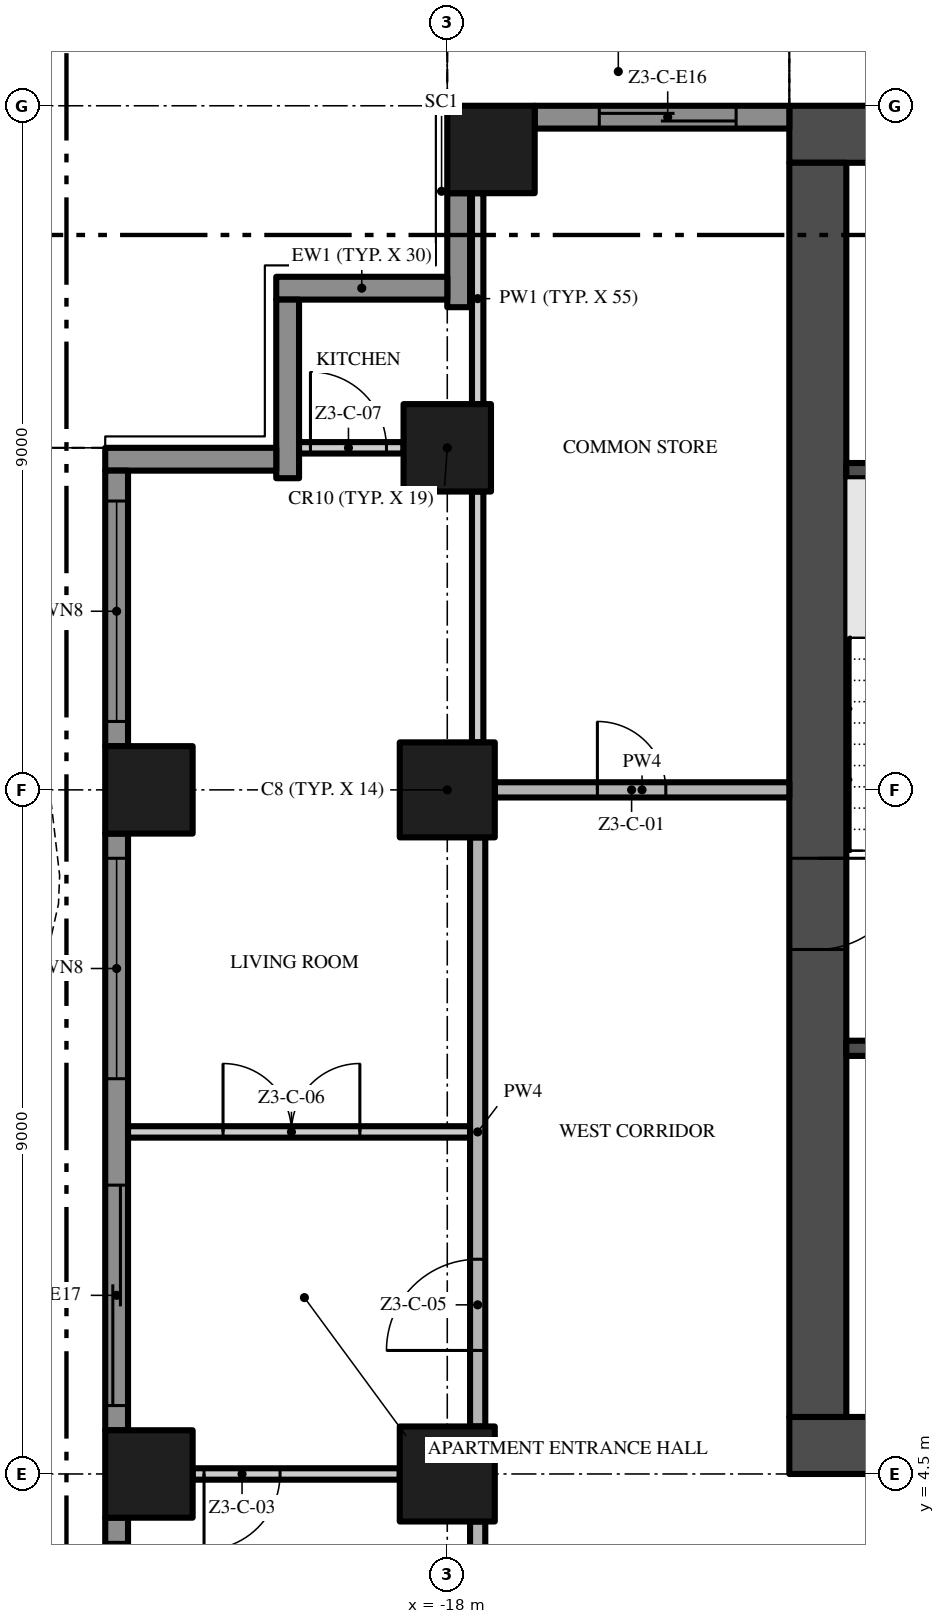
"""IFC4 building model, lengths in metres.
Left out: names, types, materials, properties, quantities, classifications, styles, units other than length and angle.
Written with IfcOpenShell. Run it as: python <this file> out.ifc"""

import sys

from ifc_helpers import new_model, si_unit, direction, frame, frame_2d, origin, origin_2d, place, context, subcontext, project, spatial, polyline, rectangle, outline, extrude, element, fill, save


model = new_model("IFC4")
c1 = context("Model", 3, precision=1e-05, world=origin(), true_north=direction((0.0, 1.0)))
c2 = subcontext(c1, "Body", "Model", "MODEL_VIEW")
j1 = project(units=[si_unit("LENGTHUNIT", "METRE"), si_unit("PLANEANGLEUNIT", "RADIAN")], contexts=[c1])
p1 = place(None, origin())
s1 = spatial("IfcSite", under=j1, at=p1, CompositionType="ELEMENT")
p2 = place(p1, origin())
s2 = spatial("IfcBuilding", under=s1, at=p2, CompositionType="ELEMENT")
p3 = place(p2, frame((0.0, 0.0, 155.4)))
s3 = spatial("IfcBuildingStorey", under=s2, at=p3, CompositionType="ELEMENT", Elevation=155.4)
p4 = place(p3, frame((-13.5, 4.875, -0.3), z_axis=(0.0, 0.0, 1.0), x_axis=(1.0, 0.0, 0.0)))
e1 = element("IfcWall", 1, at=p4, inside=s3, PredefinedType="SHEAR", context=c2, shape_type="SweptSolid", body=[
    extrude(rectangle(XDim=27.0, YDim=0.75, at=frame_2d((13.5, 0.0))), origin(), (0.0, 0.0, 1.0), 3.8),
])
p5 = place(p4, frame((12.0, 0.0, 0.3)))
e2 = element("IfcOpeningElement", 2, at=p5, cuts=e1, PredefinedType="OPENING", context=c2, shape_type="SweptSolid", body=[
    extrude(rectangle(XDim=3.0, YDim=2.4, at=frame_2d((1.5, 1.2))), frame((0.0, 0.385, 0.0), z_axis=(0.0, -1.0, 0.0), x_axis=(1.0, 0.0, 0.0)), (0.0, 0.0, 1.0), 0.77),
])
p6 = place(p4, frame((4.9, 0.0, 0.3)))
e3 = element("IfcOpeningElement", 3, at=p6, cuts=e1, PredefinedType="OPENING", context=c2, shape_type="SweptSolid", body=[
    extrude(rectangle(XDim=1.2, YDim=2.2, at=frame_2d((0.6, 1.1))), frame((0.0, 0.385, 0.0), z_axis=(0.0, -1.0, 0.0), x_axis=(1.0, 0.0, 0.0)), (0.0, 0.0, 1.0), 0.77),
])
p7 = place(p4, frame((20.75, 0.0, 0.3)))
e4 = element("IfcOpeningElement", 4, at=p7, cuts=e1, PredefinedType="OPENING", context=c2, shape_type="SweptSolid", body=[
    extrude(rectangle(XDim=1.5, YDim=2.2, at=frame_2d((0.75, 1.1))), frame((0.0, 0.385, 0.0), z_axis=(0.0, -1.0, 0.0), x_axis=(1.0, 0.0, 0.0)), (0.0, 0.0, 1.0), 0.77),
])
p8 = place(p4, frame((17.4, 0.0, 0.3)))
e5 = element("IfcOpeningElement", 5, at=p8, cuts=e1, PredefinedType="OPENING", context=c2, shape_type="SweptSolid", body=[
    extrude(rectangle(XDim=1.2, YDim=2.2, at=frame_2d((0.6, 1.1))), frame((0.0, 0.385, 0.0), z_axis=(0.0, -1.0, 0.0), x_axis=(1.0, 0.0, 0.0)), (0.0, 0.0, 1.0), 0.77),
])
p9 = place(p3, frame((13.5, 22.125, -0.3), z_axis=(0.0, 0.0, 1.0), x_axis=(-1.0, 0.0, 0.0)))
e6 = element("IfcWall", 6, at=p9, inside=s3, PredefinedType="SHEAR", context=c2, shape_type="SweptSolid", body=[
    extrude(rectangle(XDim=27.0, YDim=0.75, at=frame_2d((13.5, 0.0))), origin(), (0.0, 0.0, 1.0), 3.8),
])
p10 = place(p3, frame((-13.125, 21.75, -0.3), z_axis=(0.0, 0.0, 1.0), x_axis=(0.0, -1.0, 0.0)))
e7 = element("IfcWall", 7, at=p10, inside=s3, PredefinedType="SHEAR", context=c2, shape_type="SweptSolid", body=[
    extrude(rectangle(XDim=16.5, YDim=0.75, at=frame_2d((8.25, 0.0))), origin(), (0.0, 0.0, 1.0), 3.8),
])
p11 = place(p10, frame((9.15, 0.0, 0.3)))
e8 = element("IfcOpeningElement", 8, at=p11, cuts=e7, PredefinedType="OPENING", context=c2, shape_type="SweptSolid", body=[
    extrude(rectangle(XDim=1.2, YDim=2.2, at=frame_2d((0.6, 1.1))), frame((0.0, 0.385, 0.0), z_axis=(0.0, -1.0, 0.0), x_axis=(1.0, 0.0, 0.0)), (0.0, 0.0, 1.0), 0.77),
])
p12 = place(p3, frame((-18.0, 13.5, 0.0), z_axis=(0.0, 0.0, 1.0), x_axis=(1.0, 0.0, 0.0)))
e9 = element("IfcColumn", 9, at=p12, inside=s3, PredefinedType="COLUMN", context=c2, shape_type="SweptSolid", body=[
    extrude(rectangle(XDim=1.25, YDim=1.25, at=origin_2d()), origin(), (0.0, 0.0, 1.0), 3.5),
])
p13 = place(p3, frame((-17.425, 21.925, 0.0), z_axis=(0.0, 0.0, 1.0), x_axis=(1.0, 0.0, 0.0)))
e10 = element("IfcColumn", 10, at=p13, inside=s3, PredefinedType="COLUMN", context=c2, shape_type="SweptSolid", body=[
    extrude(rectangle(XDim=1.15, YDim=1.15, at=origin_2d()), origin(), (0.0, 0.0, 1.0), 3.5),
])
p14 = place(p3, frame((-18.0, 4.5, 0.0), z_axis=(0.0, 0.0, 1.0), x_axis=(1.0, 0.0, 0.0)))
e11 = element("IfcColumn", 11, at=p14, inside=s3, PredefinedType="COLUMN", context=c2, shape_type="SweptSolid", body=[
    extrude(rectangle(XDim=1.25, YDim=1.25, at=origin_2d()), origin(), (0.0, 0.0, 1.0), 3.5),
])
for number, where, z_axis, x_axis in (
    (12, (-21.925, 13.5, 0.0), (0.0, 0.0, 1.0), (1.0, 0.0, 0.0)),
    (13, (-18.0, 18.0, 0.0), (0.0, 0.0, 1.0), (1.0, 0.0, 0.0)),
    (14, (-21.925, 4.5, 0.0), (0.0, 0.0, 1.0), (1.0, 0.0, 0.0)),
):
    element("IfcColumn", number, at=place(p3, frame(where, z_axis=z_axis, x_axis=x_axis)), inside=s3, PredefinedType="COLUMN", context=c2, shape_type="SweptSolid", body=[
        extrude(rectangle(XDim=1.15, YDim=1.15, at=origin_2d()), origin(), (0.0, 0.0, 1.0), 3.5),
    ])
p15 = place(p3, frame((-16.85, 22.35, 0.0), z_axis=(0.0, 0.0, 1.0), x_axis=(1.0, 0.0, 0.0)))
e15 = element("IfcWall", 15, at=p15, inside=s3, PredefinedType="SOLIDWALL", context=c2, shape_type="SweptSolid", body=[
    extrude(rectangle(XDim=3.35, YDim=0.3, at=frame_2d((1.675, 0.0))), origin(), (0.0, 0.0, 1.0), 3.5),
])
p16 = place(p15, frame((0.85, 0.0, 0.0)))
e16 = element("IfcOpeningElement", 16, at=p16, cuts=e15, PredefinedType="OPENING", context=c2, shape_type="SweptSolid", body=[
    extrude(rectangle(XDim=1.8, YDim=2.4, at=frame_2d((0.9, 1.2))), frame((0.0, 0.16, 0.0), z_axis=(0.0, -1.0, 0.0), x_axis=(1.0, 0.0, 0.0)), (0.0, 0.0, 1.0), 0.32),
])
p17 = place(p3, frame((-17.85, 19.85, 0.0), z_axis=(0.0, 0.0, 1.0), x_axis=(0.0, 1.0, 0.0)))
e17 = element("IfcWall", 17, at=p17, inside=s3, PredefinedType="SOLIDWALL", context=c2, shape_type="SweptSolid", body=[
    extrude(rectangle(XDim=1.5, YDim=0.3, at=frame_2d((0.75, 0.0))), origin(), (0.0, 0.0, 1.0), 3.5),
])
p18 = place(p3, frame((-20.25, 20.1, 0.0), z_axis=(0.0, 0.0, 1.0), x_axis=(1.0, 0.0, 0.0)))
e18 = element("IfcWall", 18, at=p18, inside=s3, PredefinedType="SOLIDWALL", context=c2, shape_type="SweptSolid", body=[
    extrude(rectangle(XDim=2.25, YDim=0.3, at=frame_2d((1.125, 0.0))), origin(), (0.0, 0.0, 1.0), 3.5),
])
p19 = place(p3, frame((-20.1, 17.6, 0.0), z_axis=(0.0, 0.0, 1.0), x_axis=(0.0, 1.0, 0.0)))
e19 = element("IfcWall", 19, at=p19, inside=s3, PredefinedType="SOLIDWALL", context=c2, shape_type="SweptSolid", body=[
    extrude(rectangle(XDim=2.35, YDim=0.3, at=frame_2d((1.175, 0.0))), origin(), (0.0, 0.0, 1.0), 3.5),
])
p20 = place(p3, frame((-22.5, 17.85, 0.0), z_axis=(0.0, 0.0, 1.0), x_axis=(1.0, 0.0, 0.0)))
e20 = element("IfcWall", 20, at=p20, inside=s3, PredefinedType="SOLIDWALL", context=c2, shape_type="SweptSolid", body=[
    extrude(rectangle(XDim=2.25, YDim=0.3, at=frame_2d((1.125, 0.0))), origin(), (0.0, 0.0, 1.0), 3.5),
])
p21 = place(p3, frame((-22.35, 14.075, 0.0), z_axis=(0.0, 0.0, 1.0), x_axis=(0.0, 1.0, 0.0)))
e21 = element("IfcWall", 21, at=p21, inside=s3, PredefinedType="SOLIDWALL", context=c2, shape_type="SweptSolid", body=[
    extrude(rectangle(XDim=3.625, YDim=0.3, at=frame_2d((1.812, 0.0))), origin(), (0.0, 0.0, 1.0), 3.5),
])
p22 = place(p21, frame((0.325, 0.0, 0.45)))
e22 = element("IfcOpeningElement", 22, at=p22, cuts=e21, PredefinedType="OPENING", context=c2, shape_type="SweptSolid", body=[
    extrude(rectangle(XDim=2.9, YDim=2.65, at=frame_2d((1.45, 1.325))), frame((0.0, 0.16, 0.0), z_axis=(0.0, -1.0, 0.0), x_axis=(1.0, 0.0, 0.0)), (0.0, 0.0, 1.0), 0.32),
])
p23 = place(p3, frame((-22.35, 5.075, 0.0), z_axis=(0.0, 0.0, 1.0), x_axis=(0.0, 1.0, 0.0)))
e23 = element("IfcWall", 23, at=p23, inside=s3, PredefinedType="SOLIDWALL", context=c2, shape_type="SweptSolid", body=[
    extrude(rectangle(XDim=7.85, YDim=0.3, at=frame_2d((3.925, 0.0))), origin(), (0.0, 0.0, 1.0), 3.5),
])
p24 = place(p23, frame((4.625, 0.0, 0.45)))
e24 = element("IfcOpeningElement", 24, at=p24, cuts=e23, PredefinedType="OPENING", context=c2, shape_type="SweptSolid", body=[
    extrude(rectangle(XDim=2.9, YDim=2.65, at=frame_2d((1.45, 1.325))), frame((0.0, 0.16, 0.0), z_axis=(0.0, -1.0, 0.0), x_axis=(1.0, 0.0, 0.0)), (0.0, 0.0, 1.0), 0.32),
])
p25 = place(p23, frame((0.325, 0.0, 0.0)))
e25 = element("IfcOpeningElement", 25, at=p25, cuts=e23, PredefinedType="OPENING", context=c2, shape_type="SweptSolid", body=[
    extrude(rectangle(XDim=2.9, YDim=2.4, at=frame_2d((1.45, 1.2))), frame((0.0, 0.16, 0.0), z_axis=(0.0, -1.0, 0.0), x_axis=(1.0, 0.0, 0.0)), (0.0, 0.0, 1.0), 0.32),
])
p26 = place(p3, frame((-22.35, -3.925, 0.0), z_axis=(0.0, 0.0, 1.0), x_axis=(0.0, 1.0, 0.0)))
e26 = element("IfcWall", 26, at=p26, inside=s3, PredefinedType="SOLIDWALL", context=c2, shape_type="SweptSolid", body=[
    extrude(rectangle(XDim=7.85, YDim=0.3, at=frame_2d((3.925, 0.0))), origin(), (0.0, 0.0, 1.0), 3.5),
])
p27 = place(p26, frame((4.625, 0.0, 0.0)))
e27 = element("IfcOpeningElement", 27, at=p27, cuts=e26, PredefinedType="OPENING", context=c2, shape_type="SweptSolid", body=[
    extrude(rectangle(XDim=2.9, YDim=2.4, at=frame_2d((1.45, 1.2))), frame((0.0, 0.16, 0.0), z_axis=(0.0, -1.0, 0.0), x_axis=(1.0, 0.0, 0.0)), (0.0, 0.0, 1.0), 0.32),
])
p28 = place(p26, frame((0.325, 0.0, 0.45)))
e28 = element("IfcOpeningElement", 28, at=p28, cuts=e26, PredefinedType="OPENING", context=c2, shape_type="SweptSolid", body=[
    extrude(rectangle(XDim=2.9, YDim=2.65, at=frame_2d((1.45, 1.325))), frame((0.0, 0.16, 0.0), z_axis=(0.0, -1.0, 0.0), x_axis=(1.0, 0.0, 0.0)), (0.0, 0.0, 1.0), 0.32),
])
p29 = place(p3, origin())
e29 = element("IfcWall", 29, at=p29, inside=s3, PredefinedType="USERDEFINED", context=c2, shape_type="SweptSolid", body=[
    extrude(outline(polyline([(-13.5, 25.149), (-15.0, 24.488), (-16.5, 23.755), (-18.0, 23.231), (-17.917, 22.995), (-16.404, 23.524), (-14.895, 24.261), (-13.399, 24.92), (-13.5, 25.149)])), origin(), (0.0, 0.0, 1.0), 0.9),
])
p30 = place(p3, origin())
e30 = element("IfcWall", 30, at=p30, inside=s3, PredefinedType="USERDEFINED", context=c2, shape_type="SweptSolid", body=[
    extrude(outline(polyline([(-25.149, 18.0), (-24.488, 16.5), (-23.755, 15.0), (-23.231, 13.5), (-23.1, 12.375), (-23.115, 12.0), (-23.451, 10.5), (-24.112, 9.0), (-24.845, 7.5), (-25.369, 6.0), (-25.5, 4.875), (-25.485, 4.5), (-25.149, 3.0), (-24.488, 1.5), (-23.755, 0.0), (-23.231, -1.5), (-23.1, -2.625), (-23.115, -3.0), (-23.451, -4.5), (-24.112, -6.0), (-24.845, -7.5), (-25.369, -9.0), (-25.5, -10.125), (-25.485, -10.5), (-25.149, -12.0), (-24.488, -13.5), (-24.259, -13.399), (-24.91, -11.921), (-25.236, -10.467), (-25.249, -10.135), (-25.124, -9.056), (-24.614, -7.596), (-23.885, -6.105), (-23.213, -4.579), (-22.866, -3.033), (-22.849, -2.615), (-22.986, -1.444), (-23.524, 0.096), (-24.261, 1.605), (-24.91, 3.079), (-25.236, 4.533), (-25.249, 4.865), (-25.124, 5.944), (-24.614, 7.404), (-23.885, 8.895), (-23.213, 10.421), (-22.866, 11.967), (-22.849, 12.385), (-22.986, 13.556), (-23.524, 15.096), (-24.261, 16.605), (-24.92, 18.101), (-25.149, 18.0)])), origin(), (0.0, 0.0, 1.0), 0.9),
])
for number, where, z_axis, x_axis in (
    (31, (-12.75, 10.1, 0.0), (0.0, 0.0, 1.0), (1.0, 0.0, 0.0)),
    (32, (-12.75, 17.7, 0.0), (0.0, 0.0, 1.0), (1.0, 0.0, 0.0)),
):
    element("IfcWall", number, at=place(p3, frame(where, z_axis=z_axis, x_axis=x_axis)), inside=s3, PredefinedType="SHEAR", context=c2, shape_type="SweptSolid", body=[
        extrude(rectangle(XDim=3.1, YDim=0.2, at=frame_2d((1.55, 0.0))), origin(), (0.0, 0.0, 1.0), 3.5),
    ])
p31 = place(p3, frame((-18.625, 4.5, 0.0), z_axis=(0.0, 0.0, 1.0), x_axis=(-1.0, 0.0, 0.0)))
e33 = element("IfcWall", 33, at=p31, inside=s3, PredefinedType="PARTITIONING", context=c2, shape_type="SweptSolid", body=[
    extrude(rectangle(XDim=2.725, YDim=0.15, at=frame_2d((1.363, 0.0))), origin(), (0.0, 0.0, 1.0), 3.5),
])
p32 = place(p31, frame((1.575, 0.0, 0.0)))
e34 = element("IfcOpeningElement", 34, at=p32, cuts=e33, PredefinedType="OPENING", context=c2, shape_type="SweptSolid", body=[
    extrude(rectangle(XDim=1.0, YDim=2.4, at=frame_2d((0.5, 1.2))), frame((0.0, 0.085, 0.0), z_axis=(0.0, -1.0, 0.0), x_axis=(1.0, 0.0, 0.0)), (0.0, 0.0, 1.0), 0.17),
])
p33 = place(p3, frame((-22.2, 9.0, 0.0), z_axis=(0.0, 0.0, 1.0), x_axis=(1.0, 0.0, 0.0)))
e35 = element("IfcWall", 35, at=p33, inside=s3, PredefinedType="PARTITIONING", context=c2, shape_type="SweptSolid", body=[
    extrude(rectangle(XDim=4.5, YDim=0.15, at=frame_2d((2.25, 0.0))), origin(), (0.0, 0.0, 1.0), 3.5),
])
p34 = place(p33, frame((1.25, 0.0, 0.0)))
e36 = element("IfcOpeningElement", 36, at=p34, cuts=e35, PredefinedType="OPENING", context=c2, shape_type="SweptSolid", body=[
    extrude(rectangle(XDim=1.8, YDim=2.4, at=frame_2d((0.9, 1.2))), frame((0.0, 0.085, 0.0), z_axis=(0.0, -1.0, 0.0), x_axis=(1.0, 0.0, 0.0)), (0.0, 0.0, 1.0), 0.17),
])
p35 = place(p3, frame((-17.375, 13.5, 0.0), z_axis=(0.0, 0.0, 1.0), x_axis=(1.0, 0.0, 0.0)))
e37 = element("IfcWall", 37, at=p35, inside=s3, PredefinedType="PARTITIONING", context=c2, shape_type="SweptSolid", body=[
    extrude(rectangle(XDim=3.875, YDim=0.2, at=frame_2d((1.938, 0.0))), origin(), (0.0, 0.0, 1.0), 3.5),
])
p36 = place(p35, frame((1.35, 0.0, 0.0)))
e38 = element("IfcOpeningElement", 38, at=p36, cuts=e37, PredefinedType="OPENING", context=c2, shape_type="SweptSolid", body=[
    extrude(rectangle(XDim=0.9, YDim=2.1, at=frame_2d((0.45, 1.05))), frame((0.0, 0.11, 0.0), z_axis=(0.0, -1.0, 0.0), x_axis=(1.0, 0.0, 0.0)), (0.0, 0.0, 1.0), 0.22),
])
p37 = place(p3, frame((-19.95, 18.0, 0.0), z_axis=(0.0, 0.0, 1.0), x_axis=(1.0, 0.0, 0.0)))
e39 = element("IfcWall", 39, at=p37, inside=s3, PredefinedType="PARTITIONING", context=c2, shape_type="SweptSolid", body=[
    extrude(rectangle(XDim=1.375, YDim=0.15, at=frame_2d((0.688, 0.0))), origin(), (0.0, 0.0, 1.0), 3.5),
])
p38 = place(p37, frame((0.15, 0.0, 0.0)))
e40 = element("IfcOpeningElement", 40, at=p38, cuts=e39, PredefinedType="OPENING", context=c2, shape_type="SweptSolid", body=[
    extrude(rectangle(XDim=1.0, YDim=2.4, at=frame_2d((0.5, 1.2))), frame((0.0, 0.085, 0.0), z_axis=(0.0, -1.0, 0.0), x_axis=(1.0, 0.0, 0.0)), (0.0, 0.0, 1.0), 0.17),
])
p39 = place(p3, frame((-17.6, -0.2, 0.0), z_axis=(0.0, 0.0, 1.0), x_axis=(0.0, 1.0, 0.0)))
e41 = element("IfcWall", 41, at=p39, inside=s3, PredefinedType="PARTITIONING", context=c2, shape_type="SweptSolid", body=[
    extrude(rectangle(XDim=4.075, YDim=0.2, at=frame_2d((2.038, 0.0))), origin(), (0.0, 0.0, 1.0), 3.5),
])
p40 = place(p3, frame((-17.6, 5.125, 0.0), z_axis=(0.0, 0.0, 1.0), x_axis=(0.0, 1.0, 0.0)))
e42 = element("IfcWall", 42, at=p40, inside=s3, PredefinedType="PARTITIONING", context=c2, shape_type="SweptSolid", body=[
    extrude(rectangle(XDim=7.75, YDim=0.2, at=frame_2d((3.875, 0.0))), origin(), (0.0, 0.0, 1.0), 3.5),
])
p41 = place(p40, frame((1.0, 0.0, 0.0)))
e43 = element("IfcOpeningElement", 43, at=p41, cuts=e42, PredefinedType="OPENING", context=c2, shape_type="SweptSolid", body=[
    extrude(rectangle(XDim=1.2, YDim=2.4, at=frame_2d((0.6, 1.2))), frame((0.0, 0.11, 0.0), z_axis=(0.0, -1.0, 0.0), x_axis=(1.0, 0.0, 0.0)), (0.0, 0.0, 1.0), 0.22),
])
p42 = place(p3, frame((-17.6, 14.125, 0.0), z_axis=(0.0, 0.0, 1.0), x_axis=(0.0, 1.0, 0.0)))
e44 = element("IfcWall", 44, at=p42, inside=s3, PredefinedType="PARTITIONING", context=c2, shape_type="SweptSolid", body=[
    extrude(rectangle(XDim=3.3, YDim=0.15, at=frame_2d((1.65, 0.0))), origin(), (0.0, 0.0, 1.0), 3.5),
])
p43 = place(p3, frame((-17.6, 18.575, 0.0), z_axis=(0.0, 0.0, 1.0), x_axis=(0.0, 1.0, 0.0)))
e45 = element("IfcWall", 45, at=p43, inside=s3, PredefinedType="PARTITIONING", context=c2, shape_type="SweptSolid", body=[
    extrude(rectangle(XDim=2.775, YDim=0.15, at=frame_2d((1.387, 0.0))), origin(), (0.0, 0.0, 1.0), 3.5),
])
p44 = place(p16, origin())
e46 = element("IfcDoor", 46, at=p44, inside=s3, OperationType="SINGLE_SWING_LEFT", PredefinedType="DOOR", context=c2, shape_type="SweptSolid", body=[
    extrude(rectangle(XDim=1.8, YDim=2.4, at=frame_2d((0.9, 1.2))), frame((0.0, 0.025, 0.0), z_axis=(0.0, -1.0, 0.0), x_axis=(1.0, 0.0, 0.0)), (0.0, 0.0, 1.0), 0.05),
])
fill(e16, e46)
p45 = place(p22, origin())
e47 = element("IfcWindow", 47, at=p45, inside=s3, PartitioningType="SINGLE_PANEL", PredefinedType="WINDOW", context=c2, shape_type="SweptSolid", body=[
    extrude(rectangle(XDim=2.9, YDim=2.65, at=frame_2d((1.45, 1.325))), frame((0.0, 0.03, 0.0), z_axis=(0.0, -1.0, 0.0), x_axis=(1.0, 0.0, 0.0)), (0.0, 0.0, 1.0), 0.06),
])
fill(e22, e47)
p46 = place(p24, origin())
e48 = element("IfcWindow", 48, at=p46, inside=s3, PartitioningType="SINGLE_PANEL", PredefinedType="WINDOW", context=c2, shape_type="SweptSolid", body=[
    extrude(rectangle(XDim=2.9, YDim=2.65, at=frame_2d((1.45, 1.325))), frame((0.0, 0.03, 0.0), z_axis=(0.0, -1.0, 0.0), x_axis=(1.0, 0.0, 0.0)), (0.0, 0.0, 1.0), 0.06),
])
fill(e24, e48)
p47 = place(p25, origin())
e49 = element("IfcDoor", 49, at=p47, inside=s3, OperationType="SINGLE_SWING_LEFT", PredefinedType="DOOR", context=c2, shape_type="SweptSolid", body=[
    extrude(rectangle(XDim=2.9, YDim=2.4, at=frame_2d((1.45, 1.2))), frame((0.0, 0.025, 0.0), z_axis=(0.0, -1.0, 0.0), x_axis=(1.0, 0.0, 0.0)), (0.0, 0.0, 1.0), 0.05),
])
fill(e25, e49)
p48 = place(p27, origin())
e50 = element("IfcDoor", 50, at=p48, inside=s3, OperationType="SINGLE_SWING_LEFT", PredefinedType="DOOR", context=c2, shape_type="SweptSolid", body=[
    extrude(rectangle(XDim=2.9, YDim=2.4, at=frame_2d((1.45, 1.2))), frame((0.0, 0.025, 0.0), z_axis=(0.0, -1.0, 0.0), x_axis=(1.0, 0.0, 0.0)), (0.0, 0.0, 1.0), 0.05),
])
fill(e27, e50)
p49 = place(p11, frame((1.2, 0.0, 0.0), z_axis=(0.0, 0.0, 1.0), x_axis=(-1.0, 0.0, 0.0)))
e51 = element("IfcDoor", 51, at=p49, inside=s3, OperationType="SINGLE_SWING_RIGHT", PredefinedType="DOOR", context=c2, shape_type="SweptSolid", body=[
    extrude(rectangle(XDim=1.2, YDim=2.2, at=frame_2d((0.6, 1.1))), frame((0.0, 0.025, 0.0), z_axis=(0.0, -1.0, 0.0), x_axis=(1.0, 0.0, 0.0)), (0.0, 0.0, 1.0), 0.05),
])
fill(e8, e51)
p50 = place(p36, origin())
e52 = element("IfcDoor", 52, at=p50, inside=s3, OperationType="SINGLE_SWING_LEFT", PredefinedType="DOOR", context=c2, shape_type="SweptSolid", body=[
    extrude(rectangle(XDim=0.9, YDim=2.1, at=frame_2d((0.45, 1.05))), frame((0.0, 0.025, 0.0), z_axis=(0.0, -1.0, 0.0), x_axis=(1.0, 0.0, 0.0)), (0.0, 0.0, 1.0), 0.05),
])
fill(e38, e52)
p51 = place(p32, origin())
e53 = element("IfcDoor", 53, at=p51, inside=s3, OperationType="SINGLE_SWING_RIGHT", PredefinedType="DOOR", context=c2, shape_type="SweptSolid", body=[
    extrude(rectangle(XDim=1.0, YDim=2.4, at=frame_2d((0.5, 1.2))), frame((0.0, 0.025, 0.0), z_axis=(0.0, -1.0, 0.0), x_axis=(1.0, 0.0, 0.0)), (0.0, 0.0, 1.0), 0.05),
])
fill(e34, e53)
p52 = place(p41, origin())
e54 = element("IfcDoor", 54, at=p52, inside=s3, OperationType="SINGLE_SWING_LEFT", PredefinedType="DOOR", context=c2, shape_type="SweptSolid", body=[
    extrude(rectangle(XDim=1.2, YDim=2.4, at=frame_2d((0.6, 1.2))), frame((0.0, 0.025, 0.0), z_axis=(0.0, -1.0, 0.0), x_axis=(1.0, 0.0, 0.0)), (0.0, 0.0, 1.0), 0.05),
])
fill(e43, e54)
p53 = place(p34, origin())
e55 = element("IfcDoor", 55, at=p53, inside=s3, OperationType="DOUBLE_DOOR_SINGLE_SWING", PredefinedType="DOOR", context=c2, shape_type="SweptSolid", body=[
    extrude(rectangle(XDim=1.8, YDim=2.4, at=frame_2d((0.9, 1.2))), frame((0.0, 0.025, 0.0), z_axis=(0.0, -1.0, 0.0), x_axis=(1.0, 0.0, 0.0)), (0.0, 0.0, 1.0), 0.05),
])
fill(e36, e55)
p54 = place(p38, origin())
e56 = element("IfcDoor", 56, at=p54, inside=s3, OperationType="SINGLE_SWING_LEFT", PredefinedType="DOOR", context=c2, shape_type="SweptSolid", body=[
    extrude(rectangle(XDim=1.0, YDim=2.4, at=frame_2d((0.5, 1.2))), frame((0.0, 0.025, 0.0), z_axis=(0.0, -1.0, 0.0), x_axis=(1.0, 0.0, 0.0)), (0.0, 0.0, 1.0), 0.05),
])
fill(e40, e56)
save(model, sys.argv[1])
